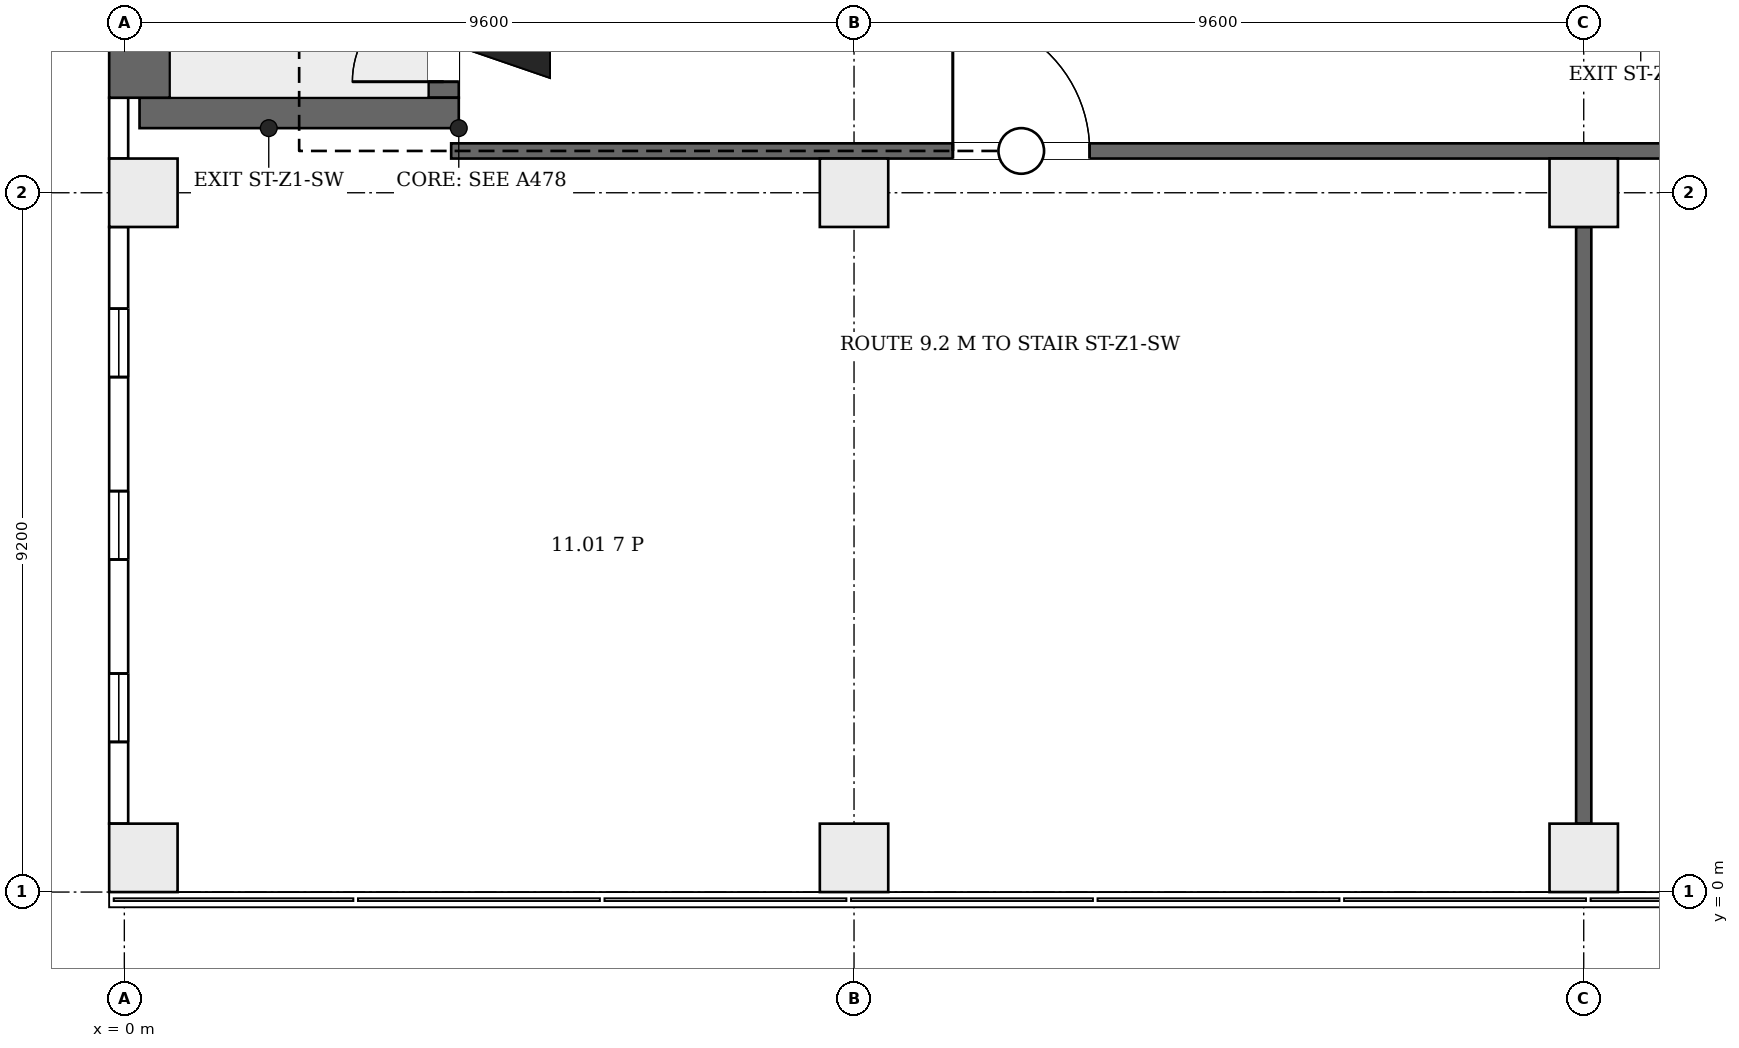
"""IFC4 building model, lengths in metres.
Left out: names, types, materials, properties, quantities, classifications, styles, units other than length and angle.
Written with IfcOpenShell. Run it as: python <this file> out.ifc"""

import sys

from ifc_helpers import new_model, si_unit, direction, frame, frame_2d, origin, origin_2d, place, context, subcontext, project, spatial, rectangle, extrude, element, fill, save


model = new_model("IFC4")
c1 = context("Model", 3, precision=1e-05, world=origin(), true_north=direction((0.0, 1.0)))
c2 = subcontext(c1, "Body", "Model", "MODEL_VIEW")
j1 = project(units=[si_unit("LENGTHUNIT", "METRE"), si_unit("PLANEANGLEUNIT", "RADIAN")], contexts=[c1])
p1 = place(None, origin())
s1 = spatial("IfcSite", under=j1, at=p1, CompositionType="ELEMENT")
p2 = place(p1, origin())
s2 = spatial("IfcBuilding", under=s1, at=p2, CompositionType="ELEMENT")
p3 = place(p2, frame((0.0, 0.0, 57.1)))
s3 = spatial("IfcBuildingStorey", under=s2, at=p3, CompositionType="ELEMENT", Elevation=57.1)
p4 = place(p3, frame((0.2, 10.25, 0.0), z_axis=(0.0, 0.0, 1.0), x_axis=(1.0, 0.0, 0.0)))
e1 = element("IfcWall", 1, at=p4, inside=s3, PredefinedType="SHEAR", context=c2, shape_type="SweptSolid", body=[
    extrude(rectangle(XDim=4.2, YDim=0.4, at=frame_2d((2.1, 0.0))), origin(), (0.0, 0.0, 1.0), 4.2),
])
p5 = place(p3, frame((0.2, 10.45, 0.0), z_axis=(0.0, 0.0, 1.0), x_axis=(0.0, 1.0, 0.0)))
e2 = element("IfcWall", 2, at=p5, inside=s3, PredefinedType="SHEAR", context=c2, shape_type="SweptSolid", body=[
    extrude(rectangle(XDim=6.6, YDim=0.8, at=frame_2d((3.3, 0.0))), origin(), (0.0, 0.0, 1.0), 4.2),
])
p6 = place(p3, frame((4.2, 10.45, 0.0), z_axis=(0.0, 0.0, 1.0), x_axis=(0.0, 1.0, 0.0)))
e3 = element("IfcWall", 3, at=p6, inside=s3, PredefinedType="SHEAR", context=c2, shape_type="SweptSolid", body=[
    extrude(rectangle(XDim=6.6, YDim=0.4, at=frame_2d((3.3, 0.0))), origin(), (0.0, 0.0, 1.0), 4.2),
])
p7 = place(p6, frame((0.21, 0.0, 0.0)))
e4 = element("IfcOpeningElement", 4, at=p7, cuts=e3, PredefinedType="OPENING", context=c2, shape_type="SweptSolid", body=[
    extrude(rectangle(XDim=1.2, YDim=2.1, at=frame_2d((0.6, 1.05))), frame((0.0, 0.21, 0.0), z_axis=(0.0, -1.0, 0.0), x_axis=(1.0, 0.0, 0.0)), (0.0, 0.0, 1.0), 0.42),
])
for number, where, z_axis, x_axis in (
    (5, (0.25, 0.45, 0.0), (0.0, 0.0, 1.0), (1.0, 0.0, 0.0)),
    (6, (9.6, 0.45, 0.0), (0.0, 0.0, 1.0), (1.0, 0.0, 0.0)),
    (7, (19.2, 0.45, 0.0), (0.0, 0.0, 1.0), (1.0, 0.0, 0.0)),
    (8, (0.25, 9.2, 0.0), (0.0, 0.0, 1.0), (1.0, 0.0, 0.0)),
    (9, (9.6, 9.2, 0.0), (0.0, 0.0, 1.0), (1.0, 0.0, 0.0)),
    (10, (19.2, 9.2, 0.0), (0.0, 0.0, 1.0), (1.0, 0.0, 0.0)),
):
    element("IfcColumn", number, at=place(p3, frame(where, z_axis=z_axis, x_axis=x_axis)), inside=s3, PredefinedType="COLUMN", context=c2, shape_type="SweptSolid", body=[
        extrude(rectangle(XDim=0.9, YDim=0.9, at=origin_2d()), origin(), (0.0, 0.0, 1.0), 4.2),
    ])
p8 = place(p3, frame((-0.074, 8.75, 0.0), z_axis=(0.0, 0.0, 1.0), x_axis=(0.0, -1.0, 0.0)))
e11 = element("IfcWall", 11, at=p8, inside=s3, PredefinedType="ELEMENTEDWALL", context=c2, shape_type="SweptSolid", body=[
    extrude(rectangle(XDim=7.85, YDim=0.25, at=frame_2d((3.925, 0.0))), origin(), (0.0, 0.0, 1.0), 3.9),
])
p9 = place(p8, frame((5.875, 0.0, 0.9)))
e12 = element("IfcOpeningElement", 12, at=p9, cuts=e11, PredefinedType="OPENING", context=c2, shape_type="SweptSolid", body=[
    extrude(rectangle(XDim=0.9, YDim=2.6, at=frame_2d((0.45, 1.3))), frame((0.0, 0.135, 0.0), z_axis=(0.0, -1.0, 0.0), x_axis=(1.0, 0.0, 0.0)), (0.0, 0.0, 1.0), 0.27),
])
p10 = place(p8, frame((3.475, 0.0, 0.9)))
e13 = element("IfcOpeningElement", 13, at=p10, cuts=e11, PredefinedType="OPENING", context=c2, shape_type="SweptSolid", body=[
    extrude(rectangle(XDim=0.9, YDim=2.6, at=frame_2d((0.45, 1.3))), frame((0.0, 0.135, 0.0), z_axis=(0.0, -1.0, 0.0), x_axis=(1.0, 0.0, 0.0)), (0.0, 0.0, 1.0), 0.27),
])
p11 = place(p8, frame((1.075, 0.0, 0.9)))
e14 = element("IfcOpeningElement", 14, at=p11, cuts=e11, PredefinedType="OPENING", context=c2, shape_type="SweptSolid", body=[
    extrude(rectangle(XDim=0.9, YDim=2.6, at=frame_2d((0.45, 1.3))), frame((0.0, 0.135, 0.0), z_axis=(0.0, -1.0, 0.0), x_axis=(1.0, 0.0, 0.0)), (0.0, 0.0, 1.0), 0.27),
])
p12 = place(p3, frame((-0.074, 10.45, 0.0), z_axis=(0.0, 0.0, 1.0), x_axis=(0.0, -1.0, 0.0)))
e15 = element("IfcWall", 15, at=p12, inside=s3, PredefinedType="ELEMENTEDWALL", context=c2, shape_type="SweptSolid", body=[
    extrude(rectangle(XDim=0.8, YDim=0.25, at=frame_2d((0.4, 0.0))), origin(), (0.0, 0.0, 1.0), 3.9),
])
p13 = place(p3, frame((4.3, 9.75, 0.0), z_axis=(0.0, 0.0, 1.0), x_axis=(1.0, 0.0, 0.0)))
e16 = element("IfcWall", 16, at=p13, inside=s3, PredefinedType="PARTITIONING", context=c2, shape_type="SweptSolid", body=[
    extrude(rectangle(XDim=43.894, YDim=0.2, at=frame_2d((21.947, 0.0))), origin(), (0.0, 0.0, 1.0), 3.9),
])
p14 = place(p13, frame((6.6, 0.0, 0.0)))
e17 = element("IfcOpeningElement", 17, at=p14, cuts=e16, PredefinedType="OPENING", context=c2, shape_type="SweptSolid", body=[
    extrude(rectangle(XDim=1.8, YDim=2.1, at=frame_2d((0.9, 1.05))), frame((0.0, 0.11, 0.0), z_axis=(0.0, -1.0, 0.0), x_axis=(1.0, 0.0, 0.0)), (0.0, 0.0, 1.0), 0.22),
])
p15 = place(p13, frame((22.25, 0.0, 0.0)))
e18 = element("IfcOpeningElement", 18, at=p15, cuts=e16, PredefinedType="OPENING", context=c2, shape_type="SweptSolid", body=[
    extrude(rectangle(XDim=1.8, YDim=2.1, at=frame_2d((0.9, 1.05))), frame((0.0, 0.11, 0.0), z_axis=(0.0, -1.0, 0.0), x_axis=(1.0, 0.0, 0.0)), (0.0, 0.0, 1.0), 0.22),
])
p16 = place(p13, frame((38.4, 0.0, 0.0)))
e19 = element("IfcOpeningElement", 19, at=p16, cuts=e16, PredefinedType="OPENING", context=c2, shape_type="SweptSolid", body=[
    extrude(rectangle(XDim=1.2, YDim=2.1, at=frame_2d((0.6, 1.05))), frame((0.0, 0.11, 0.0), z_axis=(0.0, -1.0, 0.0), x_axis=(1.0, 0.0, 0.0)), (0.0, 0.0, 1.0), 0.22),
])
p17 = place(p3, frame((19.2, 0.9, 0.0), z_axis=(0.0, 0.0, 1.0), x_axis=(0.0, 1.0, 0.0)))
e20 = element("IfcWall", 20, at=p17, inside=s3, PredefinedType="PARTITIONING", context=c2, shape_type="SweptSolid", body=[
    extrude(rectangle(XDim=7.85, YDim=0.2, at=frame_2d((3.925, 0.0))), origin(), (0.0, 0.0, 1.0), 3.9),
])
p18 = place(p9, origin())
e21 = element("IfcWindow", 21, at=p18, inside=s3, PartitioningType="SINGLE_PANEL", PredefinedType="WINDOW", context=c2, shape_type="SweptSolid", body=[
    extrude(rectangle(XDim=0.9, YDim=2.6, at=frame_2d((0.45, 1.3))), frame((0.0, 0.03, 0.0), z_axis=(0.0, -1.0, 0.0), x_axis=(1.0, 0.0, 0.0)), (0.0, 0.0, 1.0), 0.06),
])
fill(e12, e21)
p19 = place(p10, origin())
e22 = element("IfcWindow", 22, at=p19, inside=s3, PartitioningType="SINGLE_PANEL", PredefinedType="WINDOW", context=c2, shape_type="SweptSolid", body=[
    extrude(rectangle(XDim=0.9, YDim=2.6, at=frame_2d((0.45, 1.3))), frame((0.0, 0.03, 0.0), z_axis=(0.0, -1.0, 0.0), x_axis=(1.0, 0.0, 0.0)), (0.0, 0.0, 1.0), 0.06),
])
fill(e13, e22)
p20 = place(p11, origin())
e23 = element("IfcWindow", 23, at=p20, inside=s3, PartitioningType="SINGLE_PANEL", PredefinedType="WINDOW", context=c2, shape_type="SweptSolid", body=[
    extrude(rectangle(XDim=0.9, YDim=2.6, at=frame_2d((0.45, 1.3))), frame((0.0, 0.03, 0.0), z_axis=(0.0, -1.0, 0.0), x_axis=(1.0, 0.0, 0.0)), (0.0, 0.0, 1.0), 0.06),
])
fill(e14, e23)
p21 = place(p7, origin())
e24 = element("IfcDoor", 24, at=p21, inside=s3, OperationType="SINGLE_SWING_RIGHT", PredefinedType="DOOR", context=c2, shape_type="SweptSolid", body=[
    extrude(rectangle(XDim=1.2, YDim=2.1, at=frame_2d((0.6, 1.05))), frame((0.0, 0.025, 0.0), z_axis=(0.0, -1.0, 0.0), x_axis=(1.0, 0.0, 0.0)), (0.0, 0.0, 1.0), 0.05),
])
fill(e4, e24)
p22 = place(p14, origin())
e25 = element("IfcDoor", 25, at=p22, inside=s3, OperationType="DOUBLE_DOOR_SINGLE_SWING", PredefinedType="DOOR", context=c2, shape_type="SweptSolid", body=[
    extrude(rectangle(XDim=1.8, YDim=2.1, at=frame_2d((0.9, 1.05))), frame((0.0, 0.025, 0.0), z_axis=(0.0, -1.0, 0.0), x_axis=(1.0, 0.0, 0.0)), (0.0, 0.0, 1.0), 0.05),
])
fill(e17, e25)
save(model, sys.argv[1])
